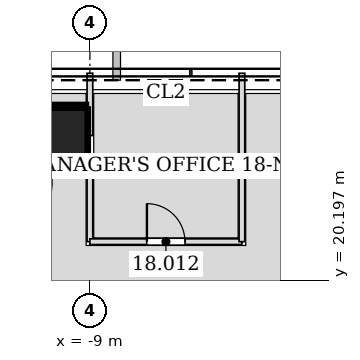
"""IFC4 building model, lengths in metres.
Left out: names, types, materials, properties, quantities, classifications, styles, units other than length and angle.
Written with IfcOpenShell. Run it as: python <this file> out.ifc"""

import sys

from ifc_helpers import new_model, si_unit, direction, frame, frame_2d, origin, origin_2d, place, context, subcontext, project, spatial, rectangle, hollow_rectangle, extrude, element, fill, save


model = new_model("IFC4")
c1 = context("Model", 3, precision=1e-05, world=origin(), true_north=direction((0.0, 1.0)))
c2 = subcontext(c1, "Body", "Model", "MODEL_VIEW")
j1 = project(units=[si_unit("LENGTHUNIT", "METRE"), si_unit("PLANEANGLEUNIT", "RADIAN")], contexts=[c1])
p1 = place(None, origin())
s1 = spatial("IfcSite", under=j1, at=p1, CompositionType="ELEMENT")
p2 = place(p1, origin())
s2 = spatial("IfcBuilding", under=s1, at=p2, CompositionType="ELEMENT")
p3 = place(p2, frame((0.0, 0.0, 83.4)))
s3 = spatial("IfcBuildingStorey", under=s2, at=p3, CompositionType="ELEMENT", Elevation=83.4)
p4 = place(p3, frame((-9.932, 23.977, 0.0), z_axis=(0.011677854952, -0.028294106277, 0.999531425846), x_axis=(0.924363308851, 0.38151339852, 0.0)))
e1 = element("IfcColumn", 1, at=p4, inside=s3, PredefinedType="COLUMN", context=c2, shape_type="SweptSolid", body=[
    extrude(hollow_rectangle(XDim=1.7, YDim=1.7, WallThickness=0.08, at=origin_2d()), origin(), (0.0, 0.0, 1.0), 4.202),
])
p5 = place(p3, frame((-9.0, 25.637, 0.0), z_axis=(0.0, 0.0, 1.0), x_axis=(0.0, -1.0, 0.0)))
e2 = element("IfcWall", 2, at=p5, inside=s3, PredefinedType="PARTITIONING", context=c2, shape_type="SweptSolid", body=[
    extrude(rectangle(XDim=1.639, YDim=0.15, at=frame_2d((0.819, 0.0))), origin(), (0.0, 0.0, 1.0), 3.497),
])
p6 = place(p3, frame((-9.0, 23.283, 0.0), z_axis=(0.0, 0.0, 1.0), x_axis=(0.0, -1.0, 0.0)))
e3 = element("IfcWall", 3, at=p6, inside=s3, PredefinedType="PARTITIONING", context=c2, shape_type="SweptSolid", body=[
    extrude(rectangle(XDim=2.078, YDim=0.15, at=frame_2d((1.039, 0.0))), origin(), (0.0, 0.0, 1.0), 3.423),
])
p7 = place(p3, frame((-9.0, 21.205, 0.0), z_axis=(0.0, 0.0, 1.0), x_axis=(1.0, 0.0, 0.0)))
e4 = element("IfcWall", 4, at=p7, inside=s3, PredefinedType="PARTITIONING", context=c2, shape_type="SweptSolid", body=[
    extrude(rectangle(XDim=4.0, YDim=0.15, at=frame_2d((2.0, 0.0))), origin(), (0.0, 0.0, 1.0), 4.035),
])
p8 = place(p7, frame((1.5, 0.0, 0.0)))
e5 = element("IfcOpeningElement", 5, at=p8, cuts=e4, PredefinedType="OPENING", context=c2, shape_type="SweptSolid", body=[
    extrude(rectangle(XDim=1.0, YDim=2.1, at=frame_2d((0.5, 1.05))), frame((0.0, 0.085, 0.0), z_axis=(0.0, -1.0, 0.0), x_axis=(1.0, 0.0, 0.0)), (0.0, 0.0, 1.0), 0.17),
])
p9 = place(p3, frame((-5.0, 21.205, 0.0), z_axis=(0.0, 0.0, 1.0), x_axis=(0.0, 1.0, 0.0)))
e6 = element("IfcWall", 6, at=p9, inside=s3, PredefinedType="PARTITIONING", context=c2, shape_type="SweptSolid", body=[
    extrude(rectangle(XDim=4.432, YDim=0.15, at=frame_2d((2.216, 0.0))), origin(), (0.0, 0.0, 1.0), 3.423),
])
p10 = place(p8, origin())
e7 = element("IfcDoor", 7, at=p10, inside=s3, OperationType="SINGLE_SWING_LEFT", PredefinedType="DOOR", context=c2, shape_type="SweptSolid", body=[
    extrude(rectangle(XDim=1.0, YDim=2.1, at=frame_2d((0.5, 1.05))), frame((0.0, 0.025, 0.0), z_axis=(0.0, -1.0, 0.0), x_axis=(1.0, 0.0, 0.0)), (0.0, 0.0, 1.0), 0.05),
])
fill(e5, e7)
save(model, sys.argv[1])
